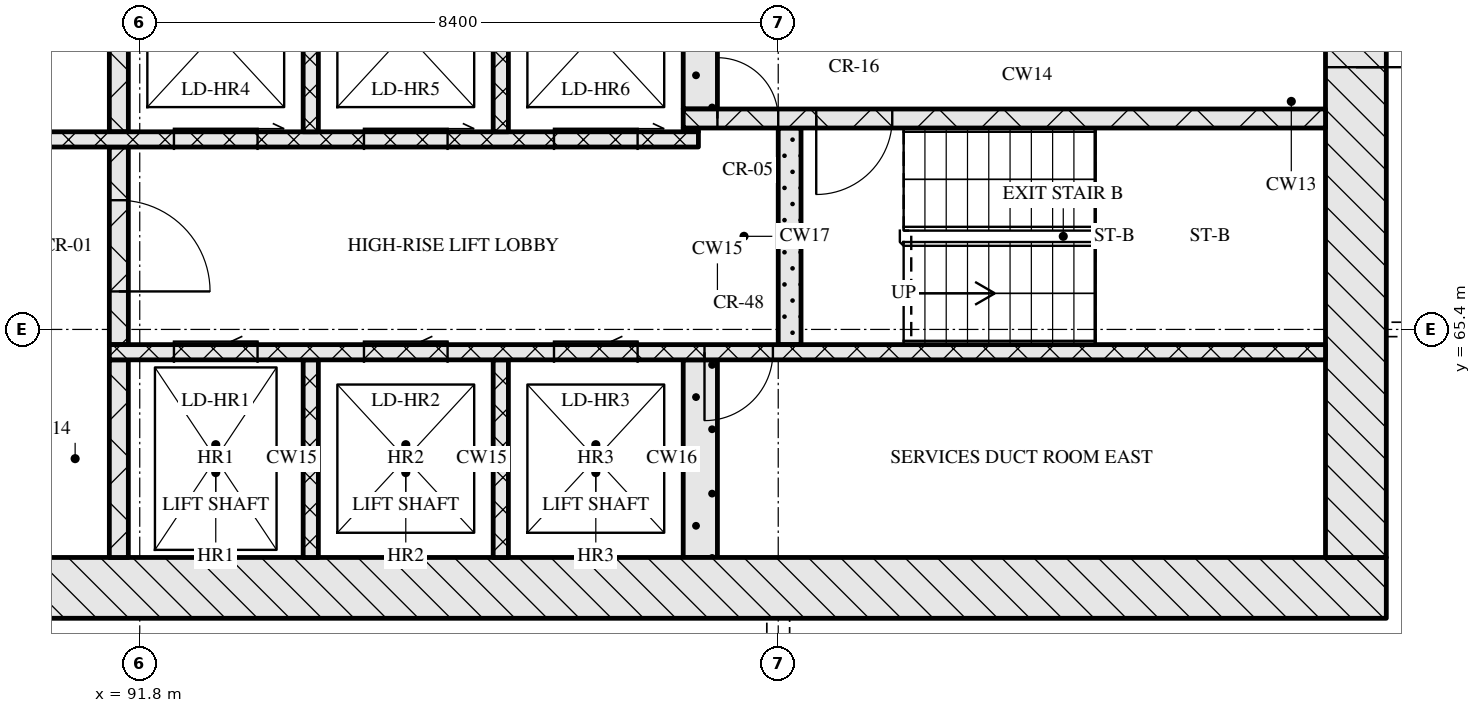
"""IFC4 building model, lengths in metres.
Left out: names, types, materials, properties, quantities, classifications, styles, units other than length and angle.
Written with IfcOpenShell. Run it as: python <this file> out.ifc"""

import sys

from ifc_helpers import new_model, si_unit, direction, frame, frame_2d, origin, place, context, subcontext, project, spatial, rectangle, extrude, element, fill, save


model = new_model("IFC4")
c1 = context("Model", 3, precision=1e-05, world=origin(), true_north=direction((0.0, 1.0)))
c2 = subcontext(c1, "Body", "Model", "MODEL_VIEW")
j1 = project(units=[si_unit("LENGTHUNIT", "METRE"), si_unit("PLANEANGLEUNIT", "RADIAN")], contexts=[c1])
p1 = place(None, origin())
s1 = spatial("IfcSite", under=j1, at=p1, CompositionType="ELEMENT")
p2 = place(p1, origin())
s2 = spatial("IfcBuilding", under=s1, at=p2, CompositionType="ELEMENT")
p3 = place(p2, frame((0.0, 0.0, 179.85)))
s3 = spatial("IfcBuildingStorey", under=s2, at=p3, CompositionType="ELEMENT", Elevation=179.85)
p4 = place(p3, frame((67.0, 62.0, 0.0), z_axis=(0.0, 0.0, 1.0), x_axis=(1.0, 0.0, 0.0)))
e1 = element("IfcWall", 1, at=p4, inside=s3, PredefinedType="SOLIDWALL", context=c2, shape_type="SweptSolid", body=[
    extrude(rectangle(XDim=41.2, YDim=0.8, at=frame_2d((20.6, 0.0))), origin(), (0.0, 0.0, 1.0), 3.32),
])
p5 = place(p4, frame((20.95, 0.0, 0.0)))
e2 = element("IfcOpeningElement", 2, at=p5, cuts=e1, PredefinedType="OPENING", context=c2, shape_type="SweptSolid", body=[
    extrude(rectangle(XDim=1.8, YDim=2.1, at=frame_2d((0.9, 1.05))), frame((0.0, 0.41, 0.0), z_axis=(0.0, -1.0, 0.0), x_axis=(1.0, 0.0, 0.0)), (0.0, 0.0, 1.0), 0.82),
])
p6 = place(p3, frame((107.8, 62.4, 0.0), z_axis=(0.0, 0.0, 1.0), x_axis=(0.0, 1.0, 0.0)))
e3 = element("IfcWall", 3, at=p6, inside=s3, PredefinedType="SOLIDWALL", context=c2, shape_type="SweptSolid", body=[
    extrude(rectangle(XDim=12.0, YDim=0.8, at=frame_2d((6.0, 0.0))), origin(), (0.0, 0.0, 1.0), 3.32),
])
p7 = place(p6, frame((6.45, 0.0, 0.0)))
e4 = element("IfcOpeningElement", 4, at=p7, cuts=e3, PredefinedType="OPENING", context=c2, shape_type="SweptSolid", body=[
    extrude(rectangle(XDim=1.2, YDim=2.1, at=frame_2d((0.6, 1.05))), frame((0.0, 0.41, 0.0), z_axis=(0.0, -1.0, 0.0), x_axis=(1.0, 0.0, 0.0)), (0.0, 0.0, 1.0), 0.82),
])
p8 = place(p3, frame((91.525, 62.4, 0.0), z_axis=(0.0, 0.0, 1.0), x_axis=(0.0, 1.0, 0.0)))
e5 = element("IfcWall", 5, at=p8, inside=s3, PredefinedType="SOLIDWALL", context=c2, shape_type="SweptSolid", body=[
    extrude(rectangle(XDim=2.6, YDim=0.25, at=frame_2d((1.3, 0.0))), origin(), (0.0, 0.0, 1.0), 3.32),
])
for number, where, z_axis, x_axis in (
    (6, (94.05, 62.4, 0.0), (0.0, 0.0, 1.0), (0.0, 1.0, 0.0)),
    (7, (96.55, 62.4, 0.0), (0.0, 0.0, 1.0), (0.0, 1.0, 0.0)),
):
    element("IfcWall", number, at=place(p3, frame(where, z_axis=z_axis, x_axis=x_axis)), inside=s3, PredefinedType="SOLIDWALL", context=c2, shape_type="SweptSolid", body=[
        extrude(rectangle(XDim=2.6, YDim=0.2, at=frame_2d((1.3, 0.0))), origin(), (0.0, 0.0, 1.0), 3.32),
    ])
p9 = place(p3, frame((99.175, 62.4, 0.0), z_axis=(0.0, 0.0, 1.0), x_axis=(0.0, 1.0, 0.0)))
e8 = element("IfcWall", 8, at=p9, inside=s3, PredefinedType="SOLIDWALL", context=c2, shape_type="SweptSolid", body=[
    extrude(rectangle(XDim=2.6, YDim=0.45, at=frame_2d((1.3, 0.0))), origin(), (0.0, 0.0, 1.0), 3.32),
])
p10 = place(p3, frame((91.4, 65.1, 0.0), z_axis=(0.0, 0.0, 1.0), x_axis=(1.0, 0.0, 0.0)))
e9 = element("IfcWall", 9, at=p10, inside=s3, PredefinedType="SOLIDWALL", context=c2, shape_type="SweptSolid", body=[
    extrude(rectangle(XDim=16.0, YDim=0.2, at=frame_2d((8.0, 0.0))), origin(), (0.0, 0.0, 1.0), 3.32),
])
p11 = place(p10, frame((0.85, 0.0, 0.0)))
e10 = element("IfcOpeningElement", 10, at=p11, cuts=e9, PredefinedType="OPENING", context=c2, shape_type="SweptSolid", body=[
    extrude(rectangle(XDim=1.1, YDim=2.1, at=frame_2d((0.55, 1.05))), frame((0.0, 0.11, 0.0), z_axis=(0.0, -1.0, 0.0), x_axis=(1.0, 0.0, 0.0)), (0.0, 0.0, 1.0), 0.22),
])
p12 = place(p10, frame((3.35, 0.0, 0.0)))
e11 = element("IfcOpeningElement", 11, at=p12, cuts=e9, PredefinedType="OPENING", context=c2, shape_type="SweptSolid", body=[
    extrude(rectangle(XDim=1.1, YDim=2.1, at=frame_2d((0.55, 1.05))), frame((0.0, 0.11, 0.0), z_axis=(0.0, -1.0, 0.0), x_axis=(1.0, 0.0, 0.0)), (0.0, 0.0, 1.0), 0.22),
])
p13 = place(p10, frame((5.85, 0.0, 0.0)))
e12 = element("IfcOpeningElement", 12, at=p13, cuts=e9, PredefinedType="OPENING", context=c2, shape_type="SweptSolid", body=[
    extrude(rectangle(XDim=1.1, YDim=2.1, at=frame_2d((0.55, 1.05))), frame((0.0, 0.11, 0.0), z_axis=(0.0, -1.0, 0.0), x_axis=(1.0, 0.0, 0.0)), (0.0, 0.0, 1.0), 0.22),
])
p14 = place(p10, frame((7.83, 0.0, 0.0)))
e13 = element("IfcOpeningElement", 13, at=p14, cuts=e9, PredefinedType="OPENING", context=c2, shape_type="SweptSolid", body=[
    extrude(rectangle(XDim=0.9, YDim=2.1, at=frame_2d((0.45, 1.05))), frame((0.0, 0.11, 0.0), z_axis=(0.0, -1.0, 0.0), x_axis=(1.0, 0.0, 0.0)), (0.0, 0.0, 1.0), 0.22),
])
p15 = place(p3, frame((91.525, 65.2, 0.0), z_axis=(0.0, 0.0, 1.0), x_axis=(0.0, 1.0, 0.0)))
e14 = element("IfcWall", 14, at=p15, inside=s3, PredefinedType="SOLIDWALL", context=c2, shape_type="SweptSolid", body=[
    extrude(rectangle(XDim=2.6, YDim=0.25, at=frame_2d((1.3, 0.0))), origin(), (0.0, 0.0, 1.0), 3.32),
])
p16 = place(p15, frame((0.7, 0.0, 0.0)))
e15 = element("IfcOpeningElement", 15, at=p16, cuts=e14, PredefinedType="OPENING", context=c2, shape_type="SweptSolid", body=[
    extrude(rectangle(XDim=1.2, YDim=2.1, at=frame_2d((0.6, 1.05))), frame((0.0, 0.135, 0.0), z_axis=(0.0, -1.0, 0.0), x_axis=(1.0, 0.0, 0.0)), (0.0, 0.0, 1.0), 0.27),
])
p17 = place(p3, frame((100.35, 65.2, 0.0), z_axis=(0.0, 0.0, 1.0), x_axis=(0.0, 1.0, 0.0)))
e16 = element("IfcWall", 16, at=p17, inside=s3, PredefinedType="SOLIDWALL", context=c2, shape_type="SweptSolid", body=[
    extrude(rectangle(XDim=2.85, YDim=0.3, at=frame_2d((1.425, 0.0))), origin(), (0.0, 0.0, 1.0), 3.32),
])
p18 = place(p3, frame((76.05, 67.9, 0.0), z_axis=(0.0, 0.0, 1.0), x_axis=(1.0, 0.0, 0.0)))
e17 = element("IfcWall", 17, at=p18, inside=s3, PredefinedType="SOLIDWALL", context=c2, shape_type="SweptSolid", body=[
    extrude(rectangle(XDim=23.1, YDim=0.2, at=frame_2d((11.55, 0.0))), origin(), (0.0, 0.0, 1.0), 3.32),
])
p19 = place(p18, frame((0.75, 0.0, 0.0)))
e18 = element("IfcOpeningElement", 18, at=p19, cuts=e17, PredefinedType="OPENING", context=c2, shape_type="SweptSolid", body=[
    extrude(rectangle(XDim=0.9, YDim=2.1, at=frame_2d((0.45, 1.05))), frame((0.0, 0.11, 0.0), z_axis=(0.0, -1.0, 0.0), x_axis=(1.0, 0.0, 0.0)), (0.0, 0.0, 1.0), 0.22),
])
p20 = place(p18, frame((3.32, 0.0, 0.0)))
e19 = element("IfcOpeningElement", 19, at=p20, cuts=e17, PredefinedType="OPENING", context=c2, shape_type="SweptSolid", body=[
    extrude(rectangle(XDim=0.9, YDim=2.1, at=frame_2d((0.45, 1.05))), frame((0.0, 0.11, 0.0), z_axis=(0.0, -1.0, 0.0), x_axis=(1.0, 0.0, 0.0)), (0.0, 0.0, 1.0), 0.22),
])
p21 = place(p18, frame((5.77, 0.0, 0.0)))
e20 = element("IfcOpeningElement", 20, at=p21, cuts=e17, PredefinedType="OPENING", context=c2, shape_type="SweptSolid", body=[
    extrude(rectangle(XDim=0.9, YDim=2.1, at=frame_2d((0.45, 1.05))), frame((0.0, 0.11, 0.0), z_axis=(0.0, -1.0, 0.0), x_axis=(1.0, 0.0, 0.0)), (0.0, 0.0, 1.0), 0.22),
])
p22 = place(p18, frame((8.45, 0.0, 0.0)))
e21 = element("IfcOpeningElement", 21, at=p22, cuts=e17, PredefinedType="OPENING", context=c2, shape_type="SweptSolid", body=[
    extrude(rectangle(XDim=0.9, YDim=2.1, at=frame_2d((0.45, 1.05))), frame((0.0, 0.11, 0.0), z_axis=(0.0, -1.0, 0.0), x_axis=(1.0, 0.0, 0.0)), (0.0, 0.0, 1.0), 0.22),
])
p23 = place(p18, frame((10.91, 0.0, 0.0)))
e22 = element("IfcOpeningElement", 22, at=p23, cuts=e17, PredefinedType="OPENING", context=c2, shape_type="SweptSolid", body=[
    extrude(rectangle(XDim=0.9, YDim=2.1, at=frame_2d((0.45, 1.05))), frame((0.0, 0.11, 0.0), z_axis=(0.0, -1.0, 0.0), x_axis=(1.0, 0.0, 0.0)), (0.0, 0.0, 1.0), 0.22),
])
p24 = place(p18, frame((13.55, 0.0, 0.0)))
e23 = element("IfcOpeningElement", 23, at=p24, cuts=e17, PredefinedType="OPENING", context=c2, shape_type="SweptSolid", body=[
    extrude(rectangle(XDim=1.0, YDim=2.1, at=frame_2d((0.5, 1.05))), frame((0.0, 0.11, 0.0), z_axis=(0.0, -1.0, 0.0), x_axis=(1.0, 0.0, 0.0)), (0.0, 0.0, 1.0), 0.22),
])
p25 = place(p18, frame((16.2, 0.0, 0.0)))
e24 = element("IfcOpeningElement", 24, at=p25, cuts=e17, PredefinedType="OPENING", context=c2, shape_type="SweptSolid", body=[
    extrude(rectangle(XDim=1.1, YDim=2.1, at=frame_2d((0.55, 1.05))), frame((0.0, 0.11, 0.0), z_axis=(0.0, -1.0, 0.0), x_axis=(1.0, 0.0, 0.0)), (0.0, 0.0, 1.0), 0.22),
])
p26 = place(p18, frame((18.7, 0.0, 0.0)))
e25 = element("IfcOpeningElement", 25, at=p26, cuts=e17, PredefinedType="OPENING", context=c2, shape_type="SweptSolid", body=[
    extrude(rectangle(XDim=1.1, YDim=2.1, at=frame_2d((0.55, 1.05))), frame((0.0, 0.11, 0.0), z_axis=(0.0, -1.0, 0.0), x_axis=(1.0, 0.0, 0.0)), (0.0, 0.0, 1.0), 0.22),
])
p27 = place(p18, frame((21.2, 0.0, 0.0)))
e26 = element("IfcOpeningElement", 26, at=p27, cuts=e17, PredefinedType="OPENING", context=c2, shape_type="SweptSolid", body=[
    extrude(rectangle(XDim=1.1, YDim=2.1, at=frame_2d((0.55, 1.05))), frame((0.0, 0.11, 0.0), z_axis=(0.0, -1.0, 0.0), x_axis=(1.0, 0.0, 0.0)), (0.0, 0.0, 1.0), 0.22),
])
p28 = place(p3, frame((91.525, 68.0, 0.0), z_axis=(0.0, 0.0, 1.0), x_axis=(0.0, 1.0, 0.0)))
e27 = element("IfcWall", 27, at=p28, inside=s3, PredefinedType="SOLIDWALL", context=c2, shape_type="SweptSolid", body=[
    extrude(rectangle(XDim=2.6, YDim=0.25, at=frame_2d((1.3, 0.0))), origin(), (0.0, 0.0, 1.0), 3.32),
])
for number, where, z_axis, x_axis in (
    (28, (94.05, 68.0, 0.0), (0.0, 0.0, 1.0), (0.0, 1.0, 0.0)),
    (29, (96.55, 68.0, 0.0), (0.0, 0.0, 1.0), (0.0, 1.0, 0.0)),
):
    element("IfcWall", number, at=place(p3, frame(where, z_axis=z_axis, x_axis=x_axis)), inside=s3, PredefinedType="SOLIDWALL", context=c2, shape_type="SweptSolid", body=[
        extrude(rectangle(XDim=2.6, YDim=0.2, at=frame_2d((1.3, 0.0))), origin(), (0.0, 0.0, 1.0), 3.32),
    ])
p29 = place(p3, frame((98.95, 68.025, 0.0), z_axis=(0.0, 0.0, 1.0), x_axis=(1.0, 0.0, 0.0)))
e30 = element("IfcWall", 30, at=p29, inside=s3, PredefinedType="SOLIDWALL", context=c2, shape_type="SweptSolid", body=[
    extrude(rectangle(XDim=0.2, YDim=0.05, at=frame_2d((0.1, 0.0))), origin(), (0.0, 0.0, 1.0), 3.32),
])
p30 = place(p3, frame((98.95, 68.175, 0.0), z_axis=(0.0, 0.0, 1.0), x_axis=(1.0, 0.0, 0.0)))
e31 = element("IfcWall", 31, at=p30, inside=s3, PredefinedType="SOLIDWALL", context=c2, shape_type="SweptSolid", body=[
    extrude(rectangle(XDim=8.45, YDim=0.25, at=frame_2d((4.225, 0.0))), origin(), (0.0, 0.0, 1.0), 3.32),
])
p31 = place(p30, frame((0.45, 0.0, 0.0)))
e32 = element("IfcOpeningElement", 32, at=p31, cuts=e31, PredefinedType="OPENING", context=c2, shape_type="SweptSolid", body=[
    extrude(rectangle(XDim=0.8, YDim=2.1, at=frame_2d((0.4, 1.05))), frame((0.0, 0.135, 0.0), z_axis=(0.0, -1.0, 0.0), x_axis=(1.0, 0.0, 0.0)), (0.0, 0.0, 1.0), 0.27),
])
p32 = place(p30, frame((1.75, 0.0, 0.0)))
e33 = element("IfcOpeningElement", 33, at=p32, cuts=e31, PredefinedType="OPENING", context=c2, shape_type="SweptSolid", body=[
    extrude(rectangle(XDim=1.0, YDim=2.1, at=frame_2d((0.5, 1.05))), frame((0.0, 0.135, 0.0), z_axis=(0.0, -1.0, 0.0), x_axis=(1.0, 0.0, 0.0)), (0.0, 0.0, 1.0), 0.27),
])
p33 = place(p3, frame((99.175, 68.3, 0.0), z_axis=(0.0, 0.0, 1.0), x_axis=(0.0, 1.0, 0.0)))
e34 = element("IfcWall", 34, at=p33, inside=s3, PredefinedType="SOLIDWALL", context=c2, shape_type="SweptSolid", body=[
    extrude(rectangle(XDim=2.3, YDim=0.45, at=frame_2d((1.15, 0.0))), origin(), (0.0, 0.0, 1.0), 3.32),
])
p34 = place(p11, origin())
e35 = element("IfcDoor", 35, at=p34, inside=s3, OperationType="SLIDING_TO_LEFT", PredefinedType="DOOR", context=c2, shape_type="SweptSolid", body=[
    extrude(rectangle(XDim=1.1, YDim=2.1, at=frame_2d((0.55, 1.05))), frame((0.0, 0.025, 0.0), z_axis=(0.0, -1.0, 0.0), x_axis=(1.0, 0.0, 0.0)), (0.0, 0.0, 1.0), 0.05),
])
fill(e10, e35)
p35 = place(p12, origin())
e36 = element("IfcDoor", 36, at=p35, inside=s3, OperationType="SLIDING_TO_LEFT", PredefinedType="DOOR", context=c2, shape_type="SweptSolid", body=[
    extrude(rectangle(XDim=1.1, YDim=2.1, at=frame_2d((0.55, 1.05))), frame((0.0, 0.025, 0.0), z_axis=(0.0, -1.0, 0.0), x_axis=(1.0, 0.0, 0.0)), (0.0, 0.0, 1.0), 0.05),
])
fill(e11, e36)
p36 = place(p13, origin())
e37 = element("IfcDoor", 37, at=p36, inside=s3, OperationType="SLIDING_TO_LEFT", PredefinedType="DOOR", context=c2, shape_type="SweptSolid", body=[
    extrude(rectangle(XDim=1.1, YDim=2.1, at=frame_2d((0.55, 1.05))), frame((0.0, 0.025, 0.0), z_axis=(0.0, -1.0, 0.0), x_axis=(1.0, 0.0, 0.0)), (0.0, 0.0, 1.0), 0.05),
])
fill(e12, e37)
p37 = place(p14, origin())
e38 = element("IfcDoor", 38, at=p37, inside=s3, OperationType="SINGLE_SWING_RIGHT", PredefinedType="DOOR", context=c2, shape_type="SweptSolid", body=[
    extrude(rectangle(XDim=0.9, YDim=2.1, at=frame_2d((0.45, 1.05))), frame((0.0, 0.025, 0.0), z_axis=(0.0, -1.0, 0.0), x_axis=(1.0, 0.0, 0.0)), (0.0, 0.0, 1.0), 0.05),
])
fill(e13, e38)
p38 = place(p16, origin())
e39 = element("IfcDoor", 39, at=p38, inside=s3, OperationType="SINGLE_SWING_RIGHT", PredefinedType="DOOR", context=c2, shape_type="SweptSolid", body=[
    extrude(rectangle(XDim=1.2, YDim=2.1, at=frame_2d((0.6, 1.05))), frame((0.0, 0.025, 0.0), z_axis=(0.0, -1.0, 0.0), x_axis=(1.0, 0.0, 0.0)), (0.0, 0.0, 1.0), 0.05),
])
fill(e15, e39)
p39 = place(p25, origin())
e40 = element("IfcDoor", 40, at=p39, inside=s3, OperationType="SLIDING_TO_RIGHT", PredefinedType="DOOR", context=c2, shape_type="SweptSolid", body=[
    extrude(rectangle(XDim=1.1, YDim=2.1, at=frame_2d((0.55, 1.05))), frame((0.0, 0.025, 0.0), z_axis=(0.0, -1.0, 0.0), x_axis=(1.0, 0.0, 0.0)), (0.0, 0.0, 1.0), 0.05),
])
fill(e24, e40)
p40 = place(p26, origin())
e41 = element("IfcDoor", 41, at=p40, inside=s3, OperationType="SLIDING_TO_RIGHT", PredefinedType="DOOR", context=c2, shape_type="SweptSolid", body=[
    extrude(rectangle(XDim=1.1, YDim=2.1, at=frame_2d((0.55, 1.05))), frame((0.0, 0.025, 0.0), z_axis=(0.0, -1.0, 0.0), x_axis=(1.0, 0.0, 0.0)), (0.0, 0.0, 1.0), 0.05),
])
fill(e25, e41)
p41 = place(p27, origin())
e42 = element("IfcDoor", 42, at=p41, inside=s3, OperationType="SLIDING_TO_RIGHT", PredefinedType="DOOR", context=c2, shape_type="SweptSolid", body=[
    extrude(rectangle(XDim=1.1, YDim=2.1, at=frame_2d((0.55, 1.05))), frame((0.0, 0.025, 0.0), z_axis=(0.0, -1.0, 0.0), x_axis=(1.0, 0.0, 0.0)), (0.0, 0.0, 1.0), 0.05),
])
fill(e26, e42)
p42 = place(p31, origin())
e43 = element("IfcDoor", 43, at=p42, inside=s3, OperationType="SINGLE_SWING_LEFT", PredefinedType="DOOR", context=c2, shape_type="SweptSolid", body=[
    extrude(rectangle(XDim=0.8, YDim=2.1, at=frame_2d((0.4, 1.05))), frame((0.0, 0.025, 0.0), z_axis=(0.0, -1.0, 0.0), x_axis=(1.0, 0.0, 0.0)), (0.0, 0.0, 1.0), 0.05),
])
fill(e32, e43)
p43 = place(p32, origin())
e44 = element("IfcDoor", 44, at=p43, inside=s3, OperationType="SINGLE_SWING_RIGHT", PredefinedType="DOOR", context=c2, shape_type="SweptSolid", body=[
    extrude(rectangle(XDim=1.0, YDim=2.1, at=frame_2d((0.5, 1.05))), frame((0.0, 0.025, 0.0), z_axis=(0.0, -1.0, 0.0), x_axis=(1.0, 0.0, 0.0)), (0.0, 0.0, 1.0), 0.05),
])
fill(e33, e44)
p44 = place(p7, origin())
e45 = element("IfcDoor", 45, at=p44, inside=s3, OperationType="SINGLE_SWING_RIGHT", PredefinedType="DOOR", context=c2, shape_type="SweptSolid", body=[
    extrude(rectangle(XDim=1.2, YDim=2.1, at=frame_2d((0.6, 1.05))), frame((0.0, 0.025, 0.0), z_axis=(0.0, -1.0, 0.0), x_axis=(1.0, 0.0, 0.0)), (0.0, 0.0, 1.0), 0.05),
])
fill(e4, e45)
save(model, sys.argv[1])
